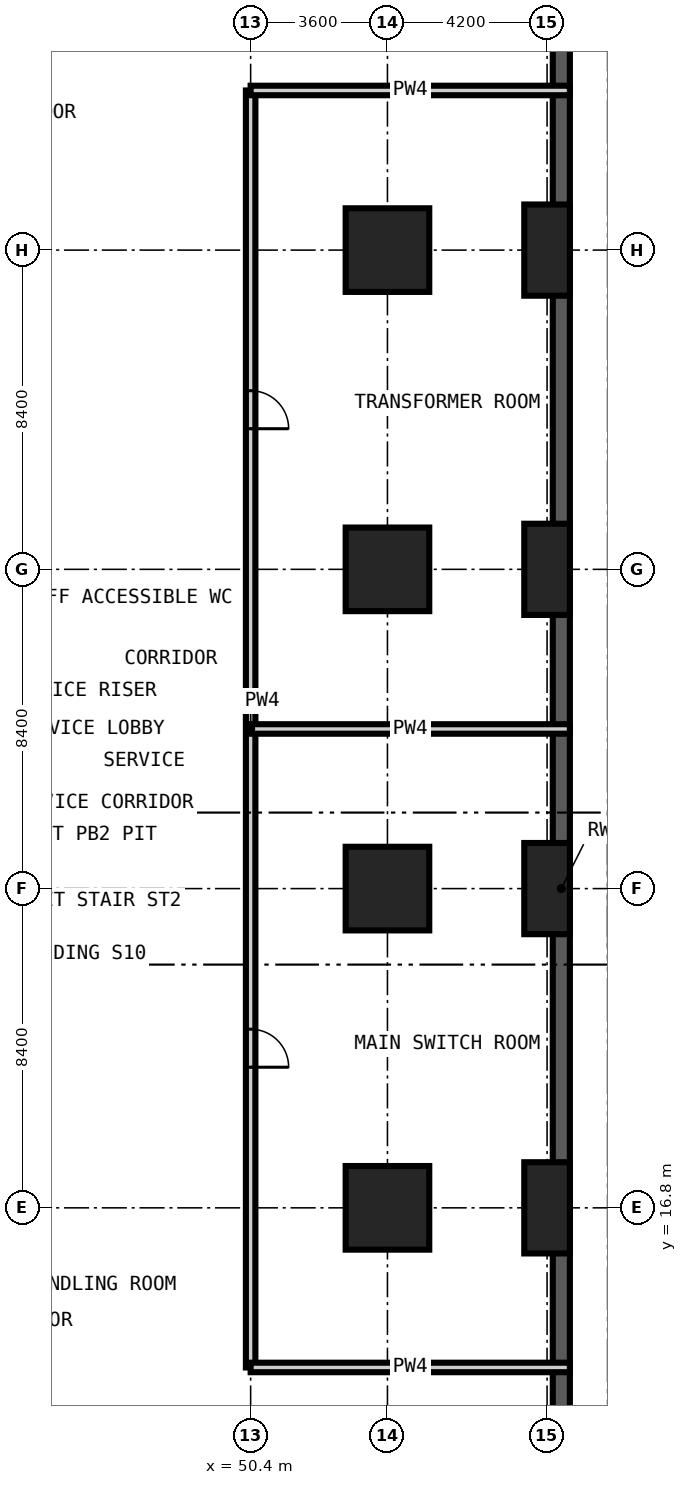
"""IFC4 building model, lengths in metres.
Left out: names, types, materials, properties, quantities, classifications, styles, units other than length and angle.
Written with IfcOpenShell. Run it as: python <this file> out.ifc"""

import sys

from ifc_helpers import new_model, si_unit, direction, frame, frame_2d, origin, origin_2d, place, context, subcontext, project, spatial, rectangle, extrude, element, fill, save


model = new_model("IFC4")
c1 = context("Model", 3, precision=1e-05, world=origin(), true_north=direction((0.0, 1.0)))
c2 = subcontext(c1, "Body", "Model", "MODEL_VIEW")
j1 = project(units=[si_unit("LENGTHUNIT", "METRE"), si_unit("PLANEANGLEUNIT", "RADIAN")], contexts=[c1])
p1 = place(None, origin())
s1 = spatial("IfcSite", under=j1, at=p1, CompositionType="ELEMENT")
p2 = place(p1, origin())
s2 = spatial("IfcBuilding", under=s1, at=p2, CompositionType="ELEMENT")
p3 = place(p2, frame((0.0, 0.0, -5.4)))
s3 = spatial("IfcBuildingStorey", under=s2, at=p3, CompositionType="ELEMENT", Elevation=-5.4)
for number, where, z_axis, x_axis in (
    (1, (54.0, 16.8, 0.0), (0.0, 0.0, 1.0), (1.0, 0.0, 0.0)),
    (2, (54.0, 25.2, 0.0), (0.0, 0.0, 1.0), (1.0, 0.0, 0.0)),
    (3, (54.0, 33.6, 0.0), (0.0, 0.0, 1.0), (1.0, 0.0, 0.0)),
    (4, (54.0, 42.0, 0.0), (0.0, 0.0, 1.0), (1.0, 0.0, 0.0)),
):
    element("IfcColumn", number, at=place(p3, frame(where, z_axis=z_axis, x_axis=x_axis)), inside=s3, PredefinedType="COLUMN", context=c2, shape_type="SweptSolid", body=[
        extrude(rectangle(XDim=2.2, YDim=2.2, at=origin_2d()), origin(), (0.0, 0.0, 1.0), 5.1),
    ])
for number, where, z_axis, x_axis in (
    (5, (58.2, 16.8, 0.0), (0.0, 0.0, 1.0), (1.0, 0.0, 0.0)),
    (6, (58.2, 25.2, 0.0), (0.0, 0.0, 1.0), (1.0, 0.0, 0.0)),
    (7, (58.2, 33.6, 0.0), (0.0, 0.0, 1.0), (1.0, 0.0, 0.0)),
    (8, (58.2, 42.0, 0.0), (0.0, 0.0, 1.0), (1.0, 0.0, 0.0)),
):
    element("IfcColumn", number, at=place(p3, frame(where, z_axis=z_axis, x_axis=x_axis)), inside=s3, PredefinedType="COLUMN", context=c2, shape_type="SweptSolid", body=[
        extrude(rectangle(XDim=1.2, YDim=2.4, at=origin_2d()), origin(), (0.0, 0.0, 1.0), 5.1),
    ])
p4 = place(p3, frame((58.575, -8.4, 0.0), z_axis=(0.0, 0.0, 1.0), x_axis=(0.0, 1.0, 0.0)))
e9 = element("IfcWall", 9, at=p4, inside=s3, PredefinedType="SOLIDWALL", context=c2, shape_type="SweptSolid", body=[
    extrude(rectangle(XDim=67.2, YDim=0.45, at=frame_2d((33.6, 0.0))), origin(), (0.0, 0.0, 1.0), 5.1),
])
p5 = place(p3, frame((50.4, 12.6, 0.0), z_axis=(0.0, 0.0, 1.0), x_axis=(0.0, 1.0, 0.0)))
e10 = element("IfcWall", 10, at=p5, inside=s3, PredefinedType="PARTITIONING", context=c2, shape_type="SweptSolid", body=[
    extrude(rectangle(XDim=33.6, YDim=0.25, at=frame_2d((16.8, 0.0))), origin(), (0.0, 0.0, 1.0), 5.1),
])
p6 = place(p5, frame((7.9, 0.0, 0.0)))
e11 = element("IfcOpeningElement", 11, at=p6, cuts=e10, PredefinedType="OPENING", context=c2, shape_type="SweptSolid", body=[
    extrude(rectangle(XDim=1.0, YDim=2.1, at=frame_2d((0.5, 1.05))), frame((0.0, 0.135, 0.0), z_axis=(0.0, -1.0, 0.0), x_axis=(1.0, 0.0, 0.0)), (0.0, 0.0, 1.0), 0.27),
])
p7 = place(p5, frame((24.7, 0.0, 0.0)))
e12 = element("IfcOpeningElement", 12, at=p7, cuts=e10, PredefinedType="OPENING", context=c2, shape_type="SweptSolid", body=[
    extrude(rectangle(XDim=1.0, YDim=2.1, at=frame_2d((0.5, 1.05))), frame((0.0, 0.135, 0.0), z_axis=(0.0, -1.0, 0.0), x_axis=(1.0, 0.0, 0.0)), (0.0, 0.0, 1.0), 0.27),
])
for number, where, z_axis, x_axis in (
    (13, (50.4, 12.6, 0.0), (0.0, 0.0, 1.0), (1.0, 0.0, 0.0)),
    (14, (50.4, 29.4, 0.0), (0.0, 0.0, 1.0), (1.0, 0.0, 0.0)),
    (15, (50.4, 46.2, 0.0), (0.0, 0.0, 1.0), (1.0, 0.0, 0.0)),
):
    element("IfcWall", number, at=place(p3, frame(where, z_axis=z_axis, x_axis=x_axis)), inside=s3, PredefinedType="PARTITIONING", context=c2, shape_type="SweptSolid", body=[
        extrude(rectangle(XDim=8.4, YDim=0.25, at=frame_2d((4.2, 0.0))), origin(), (0.0, 0.0, 1.0), 5.1),
    ])
p8 = place(p6, frame((1.0, 0.0, 0.0), z_axis=(0.0, 0.0, 1.0), x_axis=(-1.0, 0.0, 0.0)))
e16 = element("IfcDoor", 16, at=p8, inside=s3, OperationType="SINGLE_SWING_RIGHT", PredefinedType="DOOR", context=c2, shape_type="SweptSolid", body=[
    extrude(rectangle(XDim=1.0, YDim=2.1, at=frame_2d((0.5, 1.05))), frame((0.0, 0.025, 0.0), z_axis=(0.0, -1.0, 0.0), x_axis=(1.0, 0.0, 0.0)), (0.0, 0.0, 1.0), 0.05),
])
fill(e11, e16)
p9 = place(p7, frame((1.0, 0.0, 0.0), z_axis=(0.0, 0.0, 1.0), x_axis=(-1.0, 0.0, 0.0)))
e17 = element("IfcDoor", 17, at=p9, inside=s3, OperationType="SINGLE_SWING_RIGHT", PredefinedType="DOOR", context=c2, shape_type="SweptSolid", body=[
    extrude(rectangle(XDim=1.0, YDim=2.1, at=frame_2d((0.5, 1.05))), frame((0.0, 0.025, 0.0), z_axis=(0.0, -1.0, 0.0), x_axis=(1.0, 0.0, 0.0)), (0.0, 0.0, 1.0), 0.05),
])
fill(e12, e17)
save(model, sys.argv[1])
